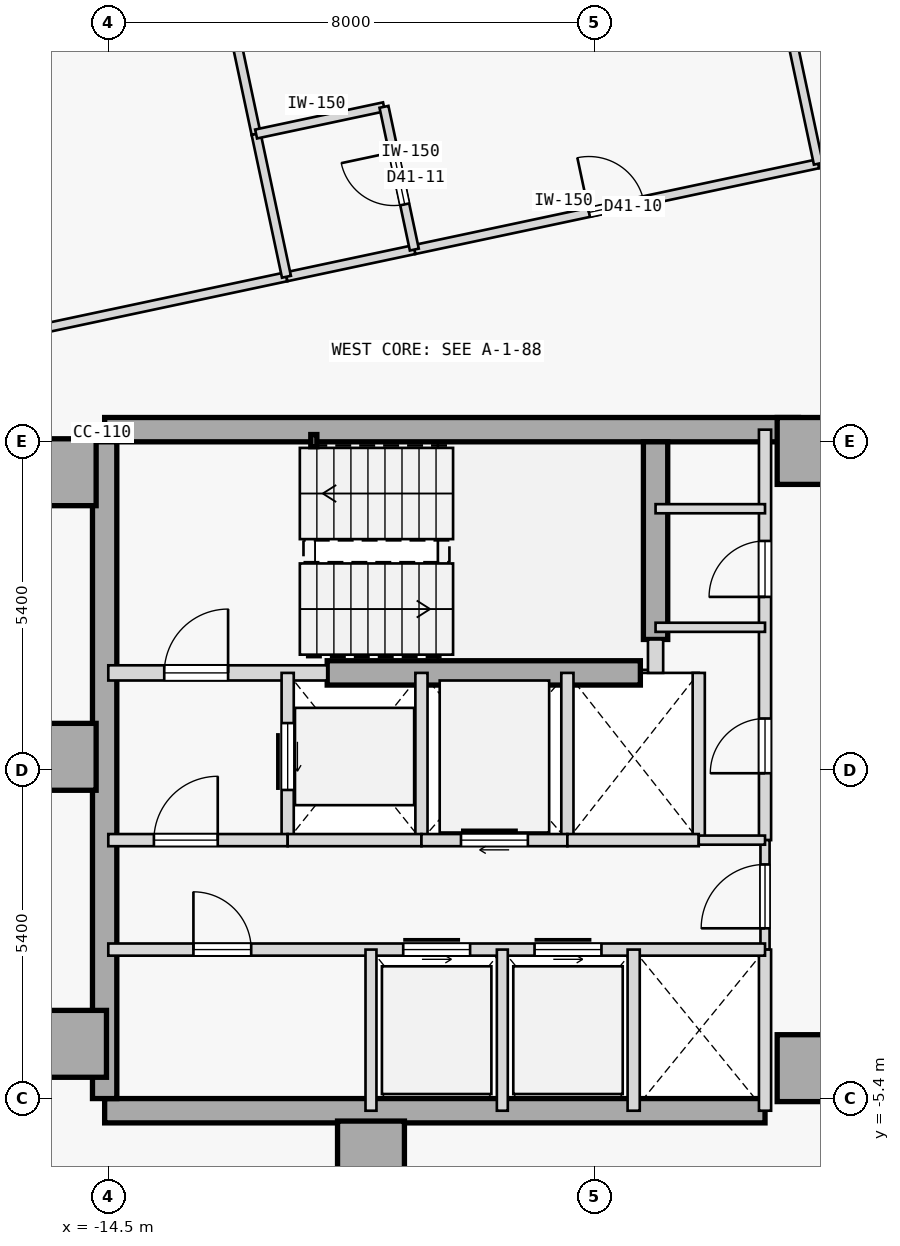
"""IFC4 building model, lengths in metres.
Left out: names, types, materials, properties, quantities, classifications, styles, units other than length and angle.
Written with IfcOpenShell. Run it as: python <this file> out.ifc"""

import sys

from ifc_helpers import new_model, si_unit, direction, frame, frame_2d, origin, origin_2d, place, context, subcontext, project, spatial, rectangle, hollow_rectangle, extrude, element, fill, save


model = new_model("IFC4")
c1 = context("Model", 3, precision=1e-05, world=origin(), true_north=direction((0.0, 1.0)))
c2 = subcontext(c1, "Body", "Model", "MODEL_VIEW")
j1 = project(units=[si_unit("LENGTHUNIT", "METRE"), si_unit("PLANEANGLEUNIT", "RADIAN")], contexts=[c1])
p1 = place(None, origin())
s1 = spatial("IfcSite", under=j1, at=p1, CompositionType="ELEMENT")
p2 = place(p1, origin())
s2 = spatial("IfcBuilding", under=s1, at=p2, CompositionType="ELEMENT")
p3 = place(p2, frame((0.0, 0.0, 161.6)))
s3 = spatial("IfcBuildingStorey", under=s2, at=p3, CompositionType="ELEMENT", Elevation=161.6)
for number, where, z_axis, x_axis in (
    (1, (-15.25, 4.9, 0.0), (0.0, 0.0, 1.0), (1.0, 0.0, 0.0)),
    (2, (-15.25, 0.22, 0.0), (0.0, 0.0, 1.0), (1.0, 0.0, 0.0)),
    (3, (-15.08, -4.5, 0.0), (0.0, 0.0, 1.0), (1.0, 0.0, 0.0)),
    (4, (-10.18, -6.32, 0.0), (0.0, 0.0, 1.0), (1.0, 0.0, 0.0)),
    (5, (-2.95, -4.9, 0.0), (0.0, 0.0, 1.0), (1.0, 0.0, 0.0)),
    (6, (-2.95, 5.25, 0.0), (0.0, 0.0, 1.0), (1.0, 0.0, 0.0)),
):
    element("IfcColumn", number, at=place(p3, frame(where, z_axis=z_axis, x_axis=x_axis)), inside=s3, PredefinedType="COLUMN", context=c2, shape_type="SweptSolid", body=[
        extrude(rectangle(XDim=1.1, YDim=1.1, at=origin_2d()), origin(), (0.0, 0.0, 1.0), 3.4),
    ])
p4 = place(p3, frame((-14.56, 5.6, 0.0), z_axis=(0.0, 0.0, 1.0), x_axis=(1.0, 0.0, 0.0)))
e7 = element("IfcWall", 7, at=p4, inside=s3, PredefinedType="SHEAR", context=c2, shape_type="SweptSolid", body=[
    extrude(rectangle(XDim=11.41, YDim=0.4, at=frame_2d((5.705, 0.0))), origin(), (0.0, 0.0, 1.0), 3.175),
])
p5 = place(p3, frame((-14.56, -5.6, 0.0), z_axis=(0.0, 0.0, 1.0), x_axis=(1.0, 0.0, 0.0)))
e8 = element("IfcWall", 8, at=p5, inside=s3, PredefinedType="SHEAR", context=c2, shape_type="SweptSolid", body=[
    extrude(rectangle(XDim=10.86, YDim=0.4, at=frame_2d((5.43, 0.0))), origin(), (0.0, 0.0, 1.0), 3.175),
])
p6 = place(p3, frame((-14.56, -5.4, 0.0), z_axis=(0.0, 0.0, 1.0), x_axis=(0.0, 1.0, 0.0)))
e9 = element("IfcWall", 9, at=p6, inside=s3, PredefinedType="SHEAR", context=c2, shape_type="SweptSolid", body=[
    extrude(rectangle(XDim=10.8, YDim=0.4, at=frame_2d((5.4, 0.0))), origin(), (0.0, 0.0, 1.0), 3.175),
])
p7 = place(p3, frame((-5.5, 2.15, 0.0), z_axis=(0.0, 0.0, 1.0), x_axis=(0.0, 1.0, 0.0)))
e10 = element("IfcWall", 10, at=p7, inside=s3, PredefinedType="SHEAR", context=c2, shape_type="SweptSolid", body=[
    extrude(rectangle(XDim=3.25, YDim=0.4, at=frame_2d((1.625, 0.0))), origin(), (0.0, 0.0, 1.0), 3.175),
])
p8 = place(p3, frame((-10.9, 1.6, 0.0), z_axis=(0.0, 0.0, 1.0), x_axis=(1.0, 0.0, 0.0)))
e11 = element("IfcWall", 11, at=p8, inside=s3, PredefinedType="SHEAR", context=c2, shape_type="SweptSolid", body=[
    extrude(rectangle(XDim=5.15, YDim=0.4, at=frame_2d((2.575, 0.0))), origin(), (0.0, 0.0, 1.0), 3.175),
])
p9 = place(p3, frame((-11.12, 5.42, 0.0), z_axis=(0.0, 0.0, 1.0), x_axis=(1.0, 0.0, 0.0)))
e12 = element("IfcColumn", 12, at=p9, inside=s3, PredefinedType="COLUMN", context=c2, shape_type="SweptSolid", body=[
    extrude(hollow_rectangle(XDim=0.1, YDim=0.2, WallThickness=0.008, at=origin_2d()), origin(), (0.0, 0.0, 1.0), 3.4),
])
p10 = place(p3, frame((-14.5, 1.6, 0.0), z_axis=(0.0, 0.0, 1.0), x_axis=(1.0, 0.0, 0.0)))
e13 = element("IfcWall", 13, at=p10, inside=s3, PredefinedType="STANDARD", context=c2, shape_type="SweptSolid", body=[
    extrude(rectangle(XDim=3.6, YDim=0.25, at=frame_2d((1.8, 0.0))), origin(), (0.0, 0.0, 1.0), 3.175),
])
p11 = place(p10, frame((0.92, 0.0, 0.0)))
e14 = element("IfcOpeningElement", 14, at=p11, cuts=e13, PredefinedType="OPENING", context=c2, shape_type="SweptSolid", body=[
    extrude(rectangle(XDim=1.05, YDim=2.15, at=frame_2d((0.525, 1.075))), frame((0.0, 0.135, 0.0), z_axis=(0.0, -1.0, 0.0), x_axis=(1.0, 0.0, 0.0)), (0.0, 0.0, 1.0), 0.27),
])
p12 = place(p3, frame((-5.5, 1.6, 0.0), z_axis=(0.0, 0.0, 1.0), x_axis=(0.0, 1.0, 0.0)))
e15 = element("IfcWall", 15, at=p12, inside=s3, PredefinedType="STANDARD", context=c2, shape_type="SweptSolid", body=[
    extrude(rectangle(XDim=0.55, YDim=0.25, at=frame_2d((0.275, 0.0))), origin(), (0.0, 0.0, 1.0), 3.175),
])
p13 = place(p3, frame((-3.7, -1.15, 0.0), z_axis=(0.0, 0.0, 1.0), x_axis=(0.0, 1.0, 0.0)))
e16 = element("IfcWall", 16, at=p13, inside=s3, PredefinedType="STANDARD", context=c2, shape_type="SweptSolid", body=[
    extrude(rectangle(XDim=6.75, YDim=0.2, at=frame_2d((3.375, 0.0))), origin(), (0.0, 0.0, 1.0), 3.175),
])
p14 = place(p13, frame((1.1, 0.0, 0.0)))
e17 = element("IfcOpeningElement", 17, at=p14, cuts=e16, PredefinedType="OPENING", context=c2, shape_type="SweptSolid", body=[
    extrude(rectangle(XDim=0.9, YDim=2.15, at=frame_2d((0.45, 1.075))), frame((0.0, 0.11, 0.0), z_axis=(0.0, -1.0, 0.0), x_axis=(1.0, 0.0, 0.0)), (0.0, 0.0, 1.0), 0.22),
])
p15 = place(p13, frame((4.0, 0.0, 0.0)))
e18 = element("IfcOpeningElement", 18, at=p15, cuts=e16, PredefinedType="OPENING", context=c2, shape_type="SweptSolid", body=[
    extrude(rectangle(XDim=0.92, YDim=2.15, at=frame_2d((0.46, 1.075))), frame((0.0, 0.11, 0.0), z_axis=(0.0, -1.0, 0.0), x_axis=(1.0, 0.0, 0.0)), (0.0, 0.0, 1.0), 0.22),
])
p16 = place(p3, frame((-3.7, -2.95, 0.0), z_axis=(0.0, 0.0, 1.0), x_axis=(0.0, 1.0, 0.0)))
e19 = element("IfcWall", 19, at=p16, inside=s3, PredefinedType="PARTITIONING", context=c2, shape_type="SweptSolid", body=[
    extrude(rectangle(XDim=1.8, YDim=0.15, at=frame_2d((0.9, 0.0))), origin(), (0.0, 0.0, 1.0), 3.175),
])
p17 = place(p16, frame((0.35, 0.0, 0.0)))
e20 = element("IfcOpeningElement", 20, at=p17, cuts=e19, PredefinedType="OPENING", context=c2, shape_type="SweptSolid", body=[
    extrude(rectangle(XDim=1.05, YDim=2.18, at=frame_2d((0.525, 1.09))), frame((0.0, 0.085, 0.0), z_axis=(0.0, -1.0, 0.0), x_axis=(1.0, 0.0, 0.0)), (0.0, 0.0, 1.0), 0.17),
])
p18 = place(p3, frame((-3.7, -5.6, 0.0), z_axis=(0.0, 0.0, 1.0), x_axis=(0.0, 1.0, 0.0)))
e21 = element("IfcWall", 21, at=p18, inside=s3, PredefinedType="STANDARD", context=c2, shape_type="SweptSolid", body=[
    extrude(rectangle(XDim=2.65, YDim=0.2, at=frame_2d((1.325, 0.0))), origin(), (0.0, 0.0, 1.0), 3.175),
])
p19 = place(p3, frame((-11.55, -1.15, 0.0), z_axis=(0.0, 0.0, 1.0), x_axis=(0.0, 1.0, 0.0)))
e22 = element("IfcWall", 22, at=p19, inside=s3, PredefinedType="STANDARD", context=c2, shape_type="SweptSolid", body=[
    extrude(rectangle(XDim=2.75, YDim=0.2, at=frame_2d((1.375, 0.0))), origin(), (0.0, 0.0, 1.0), 3.175),
])
p20 = place(p19, frame((0.825, 0.0, 0.0)))
e23 = element("IfcOpeningElement", 23, at=p20, cuts=e22, PredefinedType="OPENING", context=c2, shape_type="SweptSolid", body=[
    extrude(rectangle(XDim=1.1, YDim=2.15, at=frame_2d((0.55, 1.075))), frame((0.0, 0.11, 0.0), z_axis=(0.0, -1.0, 0.0), x_axis=(1.0, 0.0, 0.0)), (0.0, 0.0, 1.0), 0.22),
])
p21 = place(p3, frame((-9.35, -1.15, 0.0), z_axis=(0.0, 0.0, 1.0), x_axis=(0.0, 1.0, 0.0)))
e24 = element("IfcWall", 24, at=p21, inside=s3, PredefinedType="STANDARD", context=c2, shape_type="SweptSolid", body=[
    extrude(rectangle(XDim=2.75, YDim=0.2, at=frame_2d((1.375, 0.0))), origin(), (0.0, 0.0, 1.0), 3.175),
])
p22 = place(p3, frame((-14.5, -1.15, 0.0), z_axis=(0.0, 0.0, 1.0), x_axis=(1.0, 0.0, 0.0)))
e25 = element("IfcWall", 25, at=p22, inside=s3, PredefinedType="STANDARD", context=c2, shape_type="SweptSolid", body=[
    extrude(rectangle(XDim=2.95, YDim=0.2, at=frame_2d((1.475, 0.0))), origin(), (0.0, 0.0, 1.0), 3.175),
])
p23 = place(p22, frame((0.75, 0.0, 0.0)))
e26 = element("IfcOpeningElement", 26, at=p23, cuts=e25, PredefinedType="OPENING", context=c2, shape_type="SweptSolid", body=[
    extrude(rectangle(XDim=1.05, YDim=2.18, at=frame_2d((0.525, 1.09))), frame((0.0, 0.11, 0.0), z_axis=(0.0, -1.0, 0.0), x_axis=(1.0, 0.0, 0.0)), (0.0, 0.0, 1.0), 0.22),
])
p24 = place(p3, frame((-11.55, -1.15, 0.0), z_axis=(0.0, 0.0, 1.0), x_axis=(1.0, 0.0, 0.0)))
e27 = element("IfcWall", 27, at=p24, inside=s3, PredefinedType="STANDARD", context=c2, shape_type="SweptSolid", body=[
    extrude(rectangle(XDim=2.2, YDim=0.2, at=frame_2d((1.1, 0.0))), origin(), (0.0, 0.0, 1.0), 3.175),
])
p25 = place(p3, frame((-6.95, -1.15, 0.0), z_axis=(0.0, 0.0, 1.0), x_axis=(0.0, 1.0, 0.0)))
e28 = element("IfcWall", 28, at=p25, inside=s3, PredefinedType="STANDARD", context=c2, shape_type="SweptSolid", body=[
    extrude(rectangle(XDim=2.75, YDim=0.2, at=frame_2d((1.375, 0.0))), origin(), (0.0, 0.0, 1.0), 3.175),
])
p26 = place(p3, frame((-9.35, -1.15, 0.0), z_axis=(0.0, 0.0, 1.0), x_axis=(1.0, 0.0, 0.0)))
e29 = element("IfcWall", 29, at=p26, inside=s3, PredefinedType="STANDARD", context=c2, shape_type="SweptSolid", body=[
    extrude(rectangle(XDim=2.4, YDim=0.2, at=frame_2d((1.2, 0.0))), origin(), (0.0, 0.0, 1.0), 3.175),
])
p27 = place(p26, frame((0.65, 0.0, 0.0)))
e30 = element("IfcOpeningElement", 30, at=p27, cuts=e29, PredefinedType="OPENING", context=c2, shape_type="SweptSolid", body=[
    extrude(rectangle(XDim=1.1, YDim=2.15, at=frame_2d((0.55, 1.075))), frame((0.0, 0.11, 0.0), z_axis=(0.0, -1.0, 0.0), x_axis=(1.0, 0.0, 0.0)), (0.0, 0.0, 1.0), 0.22),
])
p28 = place(p3, frame((-4.79, -1.15, 0.0), z_axis=(0.0, 0.0, 1.0), x_axis=(0.0, 1.0, 0.0)))
e31 = element("IfcWall", 31, at=p28, inside=s3, PredefinedType="STANDARD", context=c2, shape_type="SweptSolid", body=[
    extrude(rectangle(XDim=2.75, YDim=0.2, at=frame_2d((1.375, 0.0))), origin(), (0.0, 0.0, 1.0), 3.175),
])
p29 = place(p3, frame((-6.95, -1.15, 0.0), z_axis=(0.0, 0.0, 1.0), x_axis=(1.0, 0.0, 0.0)))
e32 = element("IfcWall", 32, at=p29, inside=s3, PredefinedType="STANDARD", context=c2, shape_type="SweptSolid", body=[
    extrude(rectangle(XDim=2.16, YDim=0.2, at=frame_2d((1.08, 0.0))), origin(), (0.0, 0.0, 1.0), 3.175),
])
p30 = place(p3, frame((-4.79, -1.15, 0.0), z_axis=(0.0, 0.0, 1.0), x_axis=(1.0, 0.0, 0.0)))
e33 = element("IfcWall", 33, at=p30, inside=s3, PredefinedType="PARTITIONING", context=c2, shape_type="SweptSolid", body=[
    extrude(rectangle(XDim=1.09, YDim=0.15, at=frame_2d((0.545, 0.0))), origin(), (0.0, 0.0, 1.0), 3.175),
])
p31 = place(p3, frame((-14.5, -2.95, 0.0), z_axis=(0.0, 0.0, 1.0), x_axis=(1.0, 0.0, 0.0)))
e34 = element("IfcWall", 34, at=p31, inside=s3, PredefinedType="STANDARD", context=c2, shape_type="SweptSolid", body=[
    extrude(rectangle(XDim=10.8, YDim=0.2, at=frame_2d((5.4, 0.0))), origin(), (0.0, 0.0, 1.0), 3.175),
])
p32 = place(p31, frame((4.85, 0.0, 0.0)))
e35 = element("IfcOpeningElement", 35, at=p32, cuts=e34, PredefinedType="OPENING", context=c2, shape_type="SweptSolid", body=[
    extrude(rectangle(XDim=1.1, YDim=2.15, at=frame_2d((0.55, 1.075))), frame((0.0, 0.11, 0.0), z_axis=(0.0, -1.0, 0.0), x_axis=(1.0, 0.0, 0.0)), (0.0, 0.0, 1.0), 0.22),
])
p33 = place(p31, frame((7.01, 0.0, 0.0)))
e36 = element("IfcOpeningElement", 36, at=p33, cuts=e34, PredefinedType="OPENING", context=c2, shape_type="SweptSolid", body=[
    extrude(rectangle(XDim=1.1, YDim=2.15, at=frame_2d((0.55, 1.075))), frame((0.0, 0.11, 0.0), z_axis=(0.0, -1.0, 0.0), x_axis=(1.0, 0.0, 0.0)), (0.0, 0.0, 1.0), 0.22),
])
p34 = place(p31, frame((1.4, 0.0, 0.0)))
e37 = element("IfcOpeningElement", 37, at=p34, cuts=e34, PredefinedType="OPENING", context=c2, shape_type="SweptSolid", body=[
    extrude(rectangle(XDim=0.95, YDim=2.15, at=frame_2d((0.475, 1.075))), frame((0.0, 0.11, 0.0), z_axis=(0.0, -1.0, 0.0), x_axis=(1.0, 0.0, 0.0)), (0.0, 0.0, 1.0), 0.22),
])
p35 = place(p3, frame((-5.86, -5.6, 0.0), z_axis=(0.0, 0.0, 1.0), x_axis=(0.0, 1.0, 0.0)))
e38 = element("IfcWall", 38, at=p35, inside=s3, PredefinedType="STANDARD", context=c2, shape_type="SweptSolid", body=[
    extrude(rectangle(XDim=2.65, YDim=0.2, at=frame_2d((1.325, 0.0))), origin(), (0.0, 0.0, 1.0), 3.175),
])
for number, where, z_axis, x_axis in (
    (39, (-10.18, -5.6, 0.0), (0.0, 0.0, 1.0), (0.0, 1.0, 0.0)),
    (40, (-8.02, -5.6, 0.0), (0.0, 0.0, 1.0), (0.0, 1.0, 0.0)),
):
    element("IfcWall", number, at=place(p3, frame(where, z_axis=z_axis, x_axis=x_axis)), inside=s3, PredefinedType="STANDARD", context=c2, shape_type="SweptSolid", body=[
        extrude(rectangle(XDim=2.65, YDim=0.18, at=frame_2d((1.325, 0.0))), origin(), (0.0, 0.0, 1.0), 3.175),
    ])
for number, where, z_axis, x_axis in (
    (41, (-5.5, 4.3, 0.0), (0.0, 0.0, 1.0), (1.0, 0.0, 0.0)),
    (42, (-5.5, 2.35, 0.0), (0.0, 0.0, 1.0), (1.0, 0.0, 0.0)),
):
    element("IfcWall", number, at=place(p3, frame(where, z_axis=z_axis, x_axis=x_axis)), inside=s3, PredefinedType="PARTITIONING", context=c2, shape_type="SweptSolid", body=[
        extrude(rectangle(XDim=1.8, YDim=0.15, at=frame_2d((0.9, 0.0))), origin(), (0.0, 0.0, 1.0), 3.175),
    ])
p36 = place(p3, frame((-17.162, 6.926, 0.0), z_axis=(0.0, 0.0, 1.0), x_axis=(0.978144196583, 0.207927705443, 0.0)))
e43 = element("IfcWall", 43, at=p36, inside=s3, PredefinedType="PARTITIONING", context=c2, shape_type="SweptSolid", body=[
    extrude(rectangle(XDim=5.717, YDim=0.15, at=frame_2d((2.858, 0.0))), origin(), (0.0, 0.0, 1.0), 3.175),
])
p37 = place(p3, frame((-9.467, 8.562, 0.0), z_axis=(0.0, 0.0, 1.0), x_axis=(0.978147157672, 0.207913775247, 0.0)))
e44 = element("IfcWall", 44, at=p37, inside=s3, PredefinedType="PARTITIONING", context=c2, shape_type="SweptSolid", body=[
    extrude(rectangle(XDim=6.793, YDim=0.15, at=frame_2d((3.396, 0.0))), origin(), (0.0, 0.0, 1.0), 3.175),
])
p38 = place(p37, frame((2.937, 0.0, 0.0)))
e45 = element("IfcOpeningElement", 45, at=p38, cuts=e44, PredefinedType="OPENING", context=c2, shape_type="SweptSolid", body=[
    extrude(rectangle(XDim=0.92, YDim=2.15, at=frame_2d((0.46, 1.075))), frame((0.0, 0.085, 0.0), z_axis=(0.0, -1.0, 0.0), x_axis=(1.0, 0.0, 0.0)), (0.0, 0.0, 1.0), 0.17),
])
for number, where, z_axis, x_axis in (
    (46, (-11.57, 8.115, 0.0), (0.0, 0.0, 1.0), (0.978, 0.208, 0.0)),
    (47, (-2.823, 9.974, 0.0), (0.0, 0.0, 1.0), (0.978, 0.208, 0.0)),
):
    element("IfcWall", number, at=place(p3, frame(where, z_axis=z_axis, x_axis=x_axis)), inside=s3, PredefinedType="PARTITIONING", context=c2, shape_type="SweptSolid", body=[
        extrude(rectangle(XDim=2.15, YDim=0.15, at=frame_2d((1.075, 0.0))), origin(), (0.0, 0.0, 1.0), 3.175),
    ])
p39 = place(p3, frame((-12.069, 10.462, 0.0), z_axis=(0.0, 0.0, 1.0), x_axis=(-0.207914988081, 0.978146899873, 0.0)))
e48 = element("IfcWall", 48, at=p39, inside=s3, PredefinedType="PARTITIONING", context=c2, shape_type="SweptSolid", body=[
    extrude(rectangle(XDim=11.995, YDim=0.15, at=frame_2d((5.998, 0.0))), origin(), (0.0, 0.0, 1.0), 3.175),
])
p40 = place(p3, frame((-11.57, 8.115, 0.0), z_axis=(0.0, 0.0, 1.0), x_axis=(-0.207917150959, 0.978146440129, 0.0)))
e49 = element("IfcWall", 49, at=p40, inside=s3, PredefinedType="PARTITIONING", context=c2, shape_type="SweptSolid", body=[
    extrude(rectangle(XDim=2.4, YDim=0.15, at=frame_2d((1.2, 0.0))), origin(), (0.0, 0.0, 1.0), 3.175),
])
p41 = place(p3, frame((-12.069, 10.462, 0.0), z_axis=(0.0, 0.0, 1.0), x_axis=(0.978146728319, 0.207915795165, 0.0)))
e50 = element("IfcWall", 50, at=p41, inside=s3, PredefinedType="PARTITIONING", context=c2, shape_type="SweptSolid", body=[
    extrude(rectangle(XDim=2.15, YDim=0.15, at=frame_2d((1.075, 0.0))), origin(), (0.0, 0.0, 1.0), 3.175),
])
p42 = place(p3, frame((-9.467, 8.562, 0.0), z_axis=(0.0, 0.0, 1.0), x_axis=(-0.207917150959, 0.978146440129, 0.0)))
e51 = element("IfcWall", 51, at=p42, inside=s3, PredefinedType="PARTITIONING", context=c2, shape_type="SweptSolid", body=[
    extrude(rectangle(XDim=2.4, YDim=0.15, at=frame_2d((1.2, 0.0))), origin(), (0.0, 0.0, 1.0), 3.175),
])
p43 = place(p42, frame((0.76, 0.0, 0.0)))
e52 = element("IfcOpeningElement", 52, at=p43, cuts=e51, PredefinedType="OPENING", context=c2, shape_type="SweptSolid", body=[
    extrude(rectangle(XDim=0.88, YDim=2.15, at=frame_2d((0.44, 1.075))), frame((0.0, 0.085, 0.0), z_axis=(0.0, -1.0, 0.0), x_axis=(1.0, 0.0, 0.0)), (0.0, 0.0, 1.0), 0.17),
])
p44 = place(p3, frame((-2.823, 9.974, 0.0), z_axis=(0.0, 0.0, 1.0), x_axis=(-0.207937840262, 0.978142042133, 0.0)))
e53 = element("IfcWall", 53, at=p44, inside=s3, PredefinedType="PARTITIONING", context=c2, shape_type="SweptSolid", body=[
    extrude(rectangle(XDim=2.4, YDim=0.15, at=frame_2d((1.2, 0.0))), origin(), (0.0, 0.0, 1.0), 3.175),
])
p45 = place(p11, origin())
e54 = element("IfcDoor", 54, at=p45, inside=s3, OperationType="SINGLE_SWING_RIGHT", PredefinedType="DOOR", context=c2, shape_type="SweptSolid", body=[
    extrude(rectangle(XDim=1.05, YDim=2.15, at=frame_2d((0.525, 1.075))), frame((0.0, 0.025, 0.0), z_axis=(0.0, -1.0, 0.0), x_axis=(1.0, 0.0, 0.0)), (0.0, 0.0, 1.0), 0.05),
])
fill(e14, e54)
p46 = place(p23, origin())
e55 = element("IfcDoor", 55, at=p46, inside=s3, OperationType="SINGLE_SWING_RIGHT", PredefinedType="DOOR", context=c2, shape_type="SweptSolid", body=[
    extrude(rectangle(XDim=1.05, YDim=2.18, at=frame_2d((0.525, 1.09))), frame((0.0, 0.025, 0.0), z_axis=(0.0, -1.0, 0.0), x_axis=(1.0, 0.0, 0.0)), (0.0, 0.0, 1.0), 0.05),
])
fill(e26, e55)
p47 = place(p17, origin())
e56 = element("IfcDoor", 56, at=p47, inside=s3, OperationType="SINGLE_SWING_LEFT", PredefinedType="DOOR", context=c2, shape_type="SweptSolid", body=[
    extrude(rectangle(XDim=1.05, YDim=2.18, at=frame_2d((0.525, 1.09))), frame((0.0, 0.025, 0.0), z_axis=(0.0, -1.0, 0.0), x_axis=(1.0, 0.0, 0.0)), (0.0, 0.0, 1.0), 0.05),
])
fill(e20, e56)
p48 = place(p20, origin())
e57 = element("IfcDoor", 57, at=p48, inside=s3, OperationType="SLIDING_TO_RIGHT", PredefinedType="DOOR", context=c2, shape_type="SweptSolid", body=[
    extrude(rectangle(XDim=1.1, YDim=2.15, at=frame_2d((0.55, 1.075))), frame((0.0, 0.025, 0.0), z_axis=(0.0, -1.0, 0.0), x_axis=(1.0, 0.0, 0.0)), (0.0, 0.0, 1.0), 0.05),
])
fill(e23, e57)
p49 = place(p27, origin())
e58 = element("IfcDoor", 58, at=p49, inside=s3, OperationType="SLIDING_TO_RIGHT", PredefinedType="DOOR", context=c2, shape_type="SweptSolid", body=[
    extrude(rectangle(XDim=1.1, YDim=2.15, at=frame_2d((0.55, 1.075))), frame((0.0, 0.025, 0.0), z_axis=(0.0, -1.0, 0.0), x_axis=(1.0, 0.0, 0.0)), (0.0, 0.0, 1.0), 0.05),
])
fill(e30, e58)
p50 = place(p32, origin())
e59 = element("IfcDoor", 59, at=p50, inside=s3, OperationType="SLIDING_TO_LEFT", PredefinedType="DOOR", context=c2, shape_type="SweptSolid", body=[
    extrude(rectangle(XDim=1.1, YDim=2.15, at=frame_2d((0.55, 1.075))), frame((0.0, 0.025, 0.0), z_axis=(0.0, -1.0, 0.0), x_axis=(1.0, 0.0, 0.0)), (0.0, 0.0, 1.0), 0.05),
])
fill(e35, e59)
p51 = place(p33, origin())
e60 = element("IfcDoor", 60, at=p51, inside=s3, OperationType="SLIDING_TO_LEFT", PredefinedType="DOOR", context=c2, shape_type="SweptSolid", body=[
    extrude(rectangle(XDim=1.1, YDim=2.15, at=frame_2d((0.55, 1.075))), frame((0.0, 0.025, 0.0), z_axis=(0.0, -1.0, 0.0), x_axis=(1.0, 0.0, 0.0)), (0.0, 0.0, 1.0), 0.05),
])
fill(e36, e60)
p52 = place(p34, origin())
e61 = element("IfcDoor", 61, at=p52, inside=s3, OperationType="SINGLE_SWING_LEFT", PredefinedType="DOOR", context=c2, shape_type="SweptSolid", body=[
    extrude(rectangle(XDim=0.95, YDim=2.15, at=frame_2d((0.475, 1.075))), frame((0.0, 0.025, 0.0), z_axis=(0.0, -1.0, 0.0), x_axis=(1.0, 0.0, 0.0)), (0.0, 0.0, 1.0), 0.05),
])
fill(e37, e61)
p53 = place(p14, origin())
e62 = element("IfcDoor", 62, at=p53, inside=s3, OperationType="SINGLE_SWING_LEFT", PredefinedType="DOOR", context=c2, shape_type="SweptSolid", body=[
    extrude(rectangle(XDim=0.9, YDim=2.15, at=frame_2d((0.45, 1.075))), frame((0.0, 0.025, 0.0), z_axis=(0.0, -1.0, 0.0), x_axis=(1.0, 0.0, 0.0)), (0.0, 0.0, 1.0), 0.05),
])
fill(e17, e62)
p54 = place(p15, origin())
e63 = element("IfcDoor", 63, at=p54, inside=s3, OperationType="SINGLE_SWING_LEFT", PredefinedType="DOOR", context=c2, shape_type="SweptSolid", body=[
    extrude(rectangle(XDim=0.92, YDim=2.15, at=frame_2d((0.46, 1.075))), frame((0.0, 0.025, 0.0), z_axis=(0.0, -1.0, 0.0), x_axis=(1.0, 0.0, 0.0)), (0.0, 0.0, 1.0), 0.05),
])
fill(e18, e63)
p55 = place(p38, origin())
e64 = element("IfcDoor", 64, at=p55, inside=s3, OperationType="SINGLE_SWING_LEFT", PredefinedType="DOOR", context=c2, shape_type="SweptSolid", body=[
    extrude(rectangle(XDim=0.92, YDim=2.15, at=frame_2d((0.46, 1.075))), frame((0.0, 0.025, 0.0), z_axis=(0.0, -1.0, 0.0), x_axis=(1.0, 0.0, 0.0)), (0.0, 0.0, 1.0), 0.05),
])
fill(e45, e64)
p56 = place(p43, origin())
e65 = element("IfcDoor", 65, at=p56, inside=s3, OperationType="SINGLE_SWING_RIGHT", PredefinedType="DOOR", context=c2, shape_type="SweptSolid", body=[
    extrude(rectangle(XDim=0.88, YDim=2.15, at=frame_2d((0.44, 1.075))), frame((0.0, 0.025, 0.0), z_axis=(0.0, -1.0, 0.0), x_axis=(1.0, 0.0, 0.0)), (0.0, 0.0, 1.0), 0.05),
])
fill(e52, e65)
save(model, sys.argv[1])
